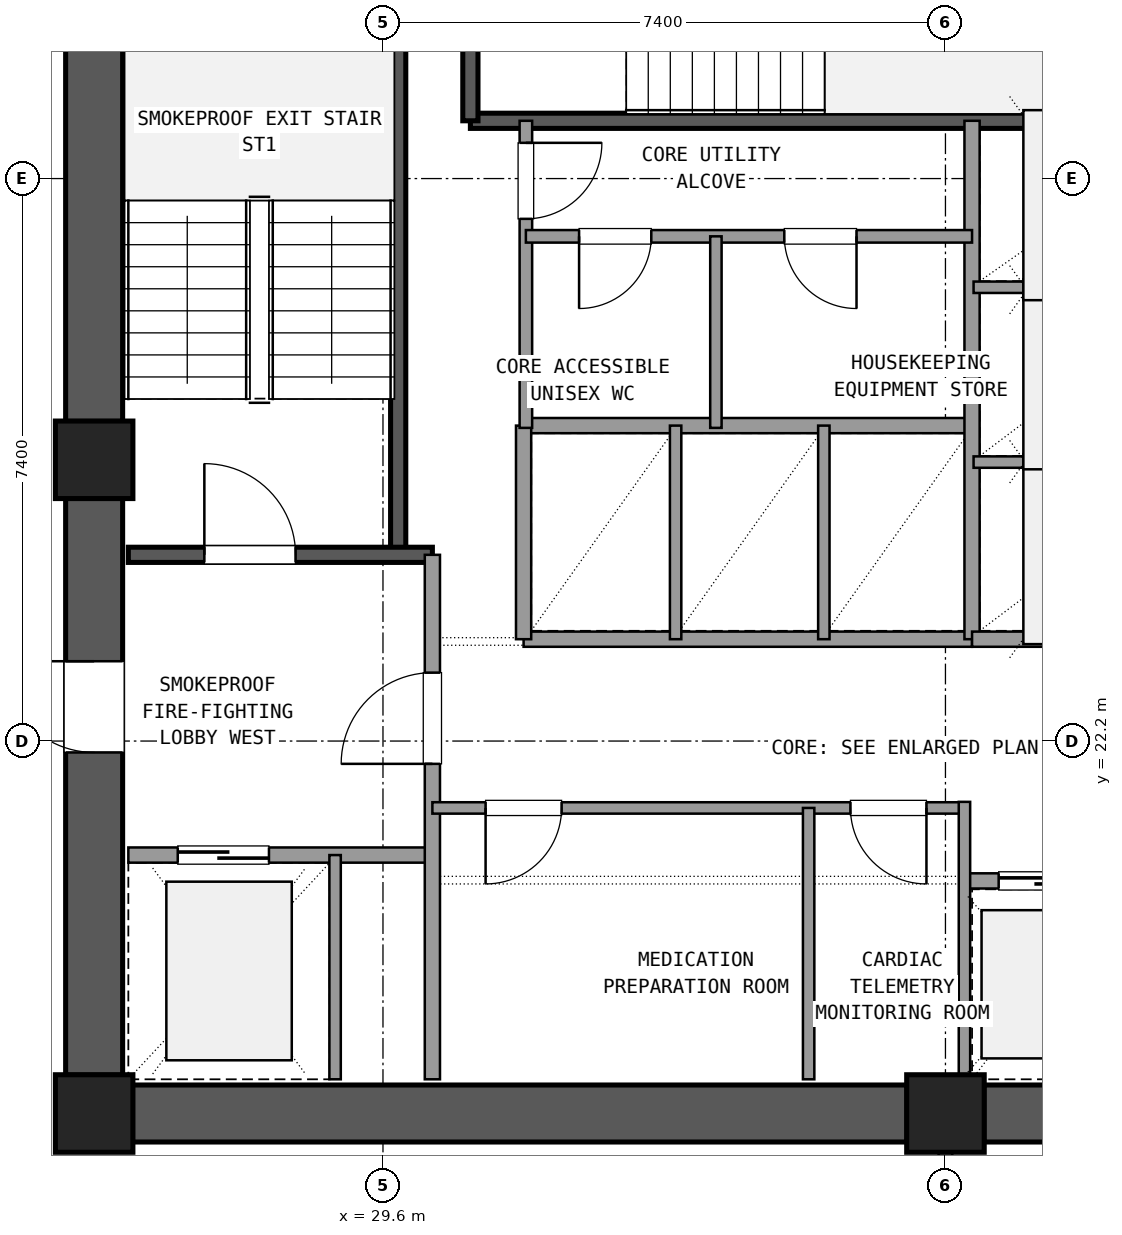
"""IFC4 building model, lengths in metres.
Left out: names, types, materials, properties, quantities, classifications, styles, units other than length and angle.
Written with IfcOpenShell. Run it as: python <this file> out.ifc"""

import sys

from ifc_helpers import new_model, si_unit, direction, frame, frame_2d, origin, origin_2d, place, context, subcontext, project, spatial, rectangle, extrude, element, fill, save


model = new_model("IFC4")
c1 = context("Model", 3, precision=1e-05, world=origin(), true_north=direction((0.0, 1.0)))
c2 = subcontext(c1, "Body", "Model", "MODEL_VIEW")
j1 = project(units=[si_unit("LENGTHUNIT", "METRE"), si_unit("PLANEANGLEUNIT", "RADIAN")], contexts=[c1])
p1 = place(None, origin())
s1 = spatial("IfcSite", under=j1, at=p1, CompositionType="ELEMENT")
p2 = place(p1, origin())
s2 = spatial("IfcBuilding", under=s1, at=p2, CompositionType="ELEMENT")
p3 = place(p2, frame((0.0, 0.0, 156.42)))
s3 = spatial("IfcBuildingStorey", under=s2, at=p3, CompositionType="ELEMENT", Elevation=156.42)
for number, where, z_axis, x_axis in (
    (1, (25.8, 17.3, 0.0), (0.0, 0.0, 1.0), (1.0, 0.0, 0.0)),
    (2, (37.0, 17.3, 0.0), (0.0, 0.0, 1.0), (1.0, 0.0, 0.0)),
    (3, (25.8, 25.9, 0.0), (0.0, 0.0, 1.0), (1.0, 0.0, 0.0)),
):
    element("IfcColumn", number, at=place(p3, frame(where, z_axis=z_axis, x_axis=x_axis)), inside=s3, PredefinedType="COLUMN", context=c2, shape_type="SweptSolid", body=[
        extrude(rectangle(XDim=1.02, YDim=1.02, at=origin_2d()), origin(), (0.0, 0.0, 1.0), 3.6),
    ])
for number, where, z_axis, x_axis in (
    (4, (26.305, 17.3, 0.0), (0.0, 0.0, 1.0), (1.0, 0.0, 0.0)),
    (5, (37.505, 17.3, 0.0), (0.0, 0.0, 1.0), (1.0, 0.0, 0.0)),
):
    element("IfcWall", number, at=place(p3, frame(where, z_axis=z_axis, x_axis=x_axis)), inside=s3, PredefinedType="SHEAR", context=c2, shape_type="SweptSolid", body=[
        extrude(rectangle(XDim=10.19, YDim=0.75, at=frame_2d((5.095, 0.0))), origin(), (0.0, 0.0, 1.0), 3.32),
    ])
p4 = place(p3, frame((25.8, 33.995, 0.0), z_axis=(0.0, 0.0, 1.0), x_axis=(0.0, -1.0, 0.0)))
e6 = element("IfcWall", 6, at=p4, inside=s3, PredefinedType="SHEAR", context=c2, shape_type="SweptSolid", body=[
    extrude(rectangle(XDim=7.59, YDim=0.75, at=frame_2d((3.795, 0.0))), origin(), (0.0, 0.0, 1.0), 3.32),
])
p5 = place(p3, frame((25.8, 25.395, 0.0), z_axis=(0.0, 0.0, 1.0), x_axis=(0.0, -1.0, 0.0)))
e7 = element("IfcWall", 7, at=p5, inside=s3, PredefinedType="SHEAR", context=c2, shape_type="SweptSolid", body=[
    extrude(rectangle(XDim=7.59, YDim=0.75, at=frame_2d((3.795, 0.0))), origin(), (0.0, 0.0, 1.0), 3.32),
])
p6 = place(p5, frame((2.145, 0.0, 0.0)))
e8 = element("IfcOpeningElement", 8, at=p6, cuts=e7, PredefinedType="OPENING", context=c2, shape_type="SweptSolid", body=[
    extrude(rectangle(XDim=1.2, YDim=2.15, at=frame_2d((0.6, 1.075))), frame((0.0, 0.385, 0.0), z_axis=(0.0, -1.0, 0.0), x_axis=(1.0, 0.0, 0.0)), (0.0, 0.0, 1.0), 0.77),
])
p7 = place(p3, frame((29.8, 24.65, 0.0), z_axis=(0.0, 0.0, 1.0), x_axis=(0.0, 1.0, 0.0)))
e9 = element("IfcWall", 9, at=p7, inside=s3, PredefinedType="SHEAR", context=c2, shape_type="SweptSolid", body=[
    extrude(rectangle(XDim=9.4, YDim=0.2, at=frame_2d((4.7, 0.0))), origin(), (0.0, 0.0, 1.0), 3.32),
])
p8 = place(p3, frame((26.25, 24.65, 0.0), z_axis=(0.0, 0.0, 1.0), x_axis=(1.0, 0.0, 0.0)))
e10 = element("IfcWall", 10, at=p8, inside=s3, PredefinedType="SHEAR", context=c2, shape_type="SweptSolid", body=[
    extrude(rectangle(XDim=4.0, YDim=0.2, at=frame_2d((2.0, 0.0))), origin(), (0.0, 0.0, 1.0), 3.32),
])
p9 = place(p8, frame((1.0, 0.0, 0.0)))
e11 = element("IfcOpeningElement", 11, at=p9, cuts=e10, PredefinedType="OPENING", context=c2, shape_type="SweptSolid", body=[
    extrude(rectangle(XDim=1.2, YDim=2.15, at=frame_2d((0.6, 1.075))), frame((0.0, 0.11, 0.0), z_axis=(0.0, -1.0, 0.0), x_axis=(1.0, 0.0, 0.0)), (0.0, 0.0, 1.0), 0.22),
])
p10 = place(p3, frame((30.75, 30.36, 0.0), z_axis=(0.0, 0.0, 1.0), x_axis=(1.0, 0.0, 0.0)))
e12 = element("IfcWall", 12, at=p10, inside=s3, PredefinedType="SHEAR", context=c2, shape_type="SweptSolid", body=[
    extrude(rectangle(XDim=9.5, YDim=0.2, at=frame_2d((4.75, 0.0))), origin(), (0.0, 0.0, 1.0), 3.32),
])
p11 = place(p3, frame((30.75, 30.36, 0.0), z_axis=(0.0, 0.0, 1.0), x_axis=(0.0, 1.0, 0.0)))
e13 = element("IfcWall", 13, at=p11, inside=s3, PredefinedType="SHEAR", context=c2, shape_type="SweptSolid", body=[
    extrude(rectangle(XDim=3.69, YDim=0.2, at=frame_2d((1.845, 0.0))), origin(), (0.0, 0.0, 1.0), 3.32),
])
p12 = place(p3, frame((26.25, 20.7, 0.0), z_axis=(0.0, 0.0, 1.0), x_axis=(1.0, 0.0, 0.0)))
e14 = element("IfcWall", 14, at=p12, inside=s3, PredefinedType="SOLIDWALL", context=c2, shape_type="SweptSolid", body=[
    extrude(rectangle(XDim=4.0, YDim=0.2, at=frame_2d((2.0, 0.0))), origin(), (0.0, 0.0, 1.0), 2.61),
])
p13 = place(p12, frame((0.65, 0.0, 0.0)))
e15 = element("IfcOpeningElement", 15, at=p13, cuts=e14, PredefinedType="OPENING", context=c2, shape_type="SweptSolid", body=[
    extrude(rectangle(XDim=1.2, YDim=2.15, at=frame_2d((0.6, 1.075))), frame((0.0, 0.11, 0.0), z_axis=(0.0, -1.0, 0.0), x_axis=(1.0, 0.0, 0.0)), (0.0, 0.0, 1.0), 0.22),
])
p14 = place(p3, frame((30.25, 17.75, 0.0), z_axis=(0.0, 0.0, 1.0), x_axis=(0.0, 1.0, 0.0)))
e16 = element("IfcWall", 16, at=p14, inside=s3, PredefinedType="SOLIDWALL", context=c2, shape_type="SweptSolid", body=[
    extrude(rectangle(XDim=6.9, YDim=0.2, at=frame_2d((3.45, 0.0))), origin(), (0.0, 0.0, 1.0), 2.61),
])
p15 = place(p14, frame((4.15, 0.0, 0.0)))
e17 = element("IfcOpeningElement", 17, at=p15, cuts=e16, PredefinedType="OPENING", context=c2, shape_type="SweptSolid", body=[
    extrude(rectangle(XDim=1.2, YDim=2.15, at=frame_2d((0.6, 1.075))), frame((0.0, 0.11, 0.0), z_axis=(0.0, -1.0, 0.0), x_axis=(1.0, 0.0, 0.0)), (0.0, 0.0, 1.0), 0.22),
])
p16 = place(p3, frame((28.97, 17.75, 0.0), z_axis=(0.0, 0.0, 1.0), x_axis=(0.0, 1.0, 0.0)))
e18 = element("IfcWall", 18, at=p16, inside=s3, PredefinedType="PARTITIONING", context=c2, shape_type="SweptSolid", body=[
    extrude(rectangle(XDim=2.95, YDim=0.15, at=frame_2d((1.475, 0.0))), origin(), (0.0, 0.0, 1.0), 2.61),
])
p17 = place(p3, frame((30.25, 21.32, 0.0), z_axis=(0.0, 0.0, 1.0), x_axis=(1.0, 0.0, 0.0)))
e19 = element("IfcWall", 19, at=p17, inside=s3, PredefinedType="PARTITIONING", context=c2, shape_type="SweptSolid", body=[
    extrude(rectangle(XDim=7.0, YDim=0.15, at=frame_2d((3.5, 0.0))), origin(), (0.0, 0.0, 1.0), 2.61),
])
p18 = place(p17, frame((0.7, 0.0, 0.0)))
e20 = element("IfcOpeningElement", 20, at=p18, cuts=e19, PredefinedType="OPENING", context=c2, shape_type="SweptSolid", body=[
    extrude(rectangle(XDim=1.0, YDim=2.15, at=frame_2d((0.5, 1.075))), frame((0.0, 0.085, 0.0), z_axis=(0.0, -1.0, 0.0), x_axis=(1.0, 0.0, 0.0)), (0.0, 0.0, 1.0), 0.17),
])
p19 = place(p17, frame((5.5, 0.0, 0.0)))
e21 = element("IfcOpeningElement", 21, at=p19, cuts=e19, PredefinedType="OPENING", context=c2, shape_type="SweptSolid", body=[
    extrude(rectangle(XDim=1.0, YDim=2.15, at=frame_2d((0.5, 1.075))), frame((0.0, 0.085, 0.0), z_axis=(0.0, -1.0, 0.0), x_axis=(1.0, 0.0, 0.0)), (0.0, 0.0, 1.0), 0.17),
])
p20 = place(p3, frame((35.2, 17.75, 0.0), z_axis=(0.0, 0.0, 1.0), x_axis=(0.0, 1.0, 0.0)))
e22 = element("IfcWall", 22, at=p20, inside=s3, PredefinedType="PARTITIONING", context=c2, shape_type="SweptSolid", body=[
    extrude(rectangle(XDim=3.57, YDim=0.15, at=frame_2d((1.785, 0.0))), origin(), (0.0, 0.0, 1.0), 2.61),
])
p21 = place(p3, frame((37.25, 20.36, 0.0), z_axis=(0.0, 0.0, 1.0), x_axis=(1.0, 0.0, 0.0)))
e23 = element("IfcWall", 23, at=p21, inside=s3, PredefinedType="SOLIDWALL", context=c2, shape_type="SweptSolid", body=[
    extrude(rectangle(XDim=6.1, YDim=0.2, at=frame_2d((3.05, 0.0))), origin(), (0.0, 0.0, 1.0), 2.61),
])
p22 = place(p21, frame((0.45, 0.0, 0.0)))
e24 = element("IfcOpeningElement", 24, at=p22, cuts=e23, PredefinedType="OPENING", context=c2, shape_type="SweptSolid", body=[
    extrude(rectangle(XDim=1.1, YDim=2.15, at=frame_2d((0.55, 1.075))), frame((0.0, 0.11, 0.0), z_axis=(0.0, -1.0, 0.0), x_axis=(1.0, 0.0, 0.0)), (0.0, 0.0, 1.0), 0.22),
])
p23 = place(p21, frame((2.5, 0.0, 0.0)))
e25 = element("IfcOpeningElement", 25, at=p23, cuts=e23, PredefinedType="OPENING", context=c2, shape_type="SweptSolid", body=[
    extrude(rectangle(XDim=1.1, YDim=2.15, at=frame_2d((0.55, 1.075))), frame((0.0, 0.11, 0.0), z_axis=(0.0, -1.0, 0.0), x_axis=(1.0, 0.0, 0.0)), (0.0, 0.0, 1.0), 0.22),
])
p24 = place(p21, frame((4.55, 0.0, 0.0)))
e26 = element("IfcOpeningElement", 26, at=p24, cuts=e23, PredefinedType="OPENING", context=c2, shape_type="SweptSolid", body=[
    extrude(rectangle(XDim=1.1, YDim=2.15, at=frame_2d((0.55, 1.075))), frame((0.0, 0.11, 0.0), z_axis=(0.0, -1.0, 0.0), x_axis=(1.0, 0.0, 0.0)), (0.0, 0.0, 1.0), 0.22),
])
p25 = place(p3, frame((37.25, 17.75, 0.0), z_axis=(0.0, 0.0, 1.0), x_axis=(0.0, 1.0, 0.0)))
e27 = element("IfcWall", 27, at=p25, inside=s3, PredefinedType="PARTITIONING", context=c2, shape_type="SweptSolid", body=[
    extrude(rectangle(XDim=3.65, YDim=0.15, at=frame_2d((1.825, 0.0))), origin(), (0.0, 0.0, 1.0), 2.61),
])
for number, where, z_axis, x_axis in (
    (28, (31.45, 23.54, 0.0), (0.0, 0.0, 1.0), (1.0, 0.0, 0.0)),
    (29, (31.45, 26.35, 0.0), (0.0, 0.0, 1.0), (1.0, 0.0, 0.0)),
):
    element("IfcWall", number, at=place(p3, frame(where, z_axis=z_axis, x_axis=x_axis)), inside=s3, PredefinedType="SOLIDWALL", context=c2, shape_type="SweptSolid", body=[
        extrude(rectangle(XDim=5.9, YDim=0.2, at=frame_2d((2.95, 0.0))), origin(), (0.0, 0.0, 1.0), 2.61),
    ])
p26 = place(p3, frame((31.45, 23.54, 0.0), z_axis=(0.0, 0.0, 1.0), x_axis=(0.0, 1.0, 0.0)))
e30 = element("IfcWall", 30, at=p26, inside=s3, PredefinedType="SOLIDWALL", context=c2, shape_type="SweptSolid", body=[
    extrude(rectangle(XDim=2.81, YDim=0.2, at=frame_2d((1.405, 0.0))), origin(), (0.0, 0.0, 1.0), 2.61),
])
for number, where, z_axis, x_axis in (
    (31, (33.45, 23.54, 0.0), (0.0, 0.0, 1.0), (0.0, 1.0, 0.0)),
    (32, (35.4, 23.54, 0.0), (0.0, 0.0, 1.0), (0.0, 1.0, 0.0)),
):
    element("IfcWall", number, at=place(p3, frame(where, z_axis=z_axis, x_axis=x_axis)), inside=s3, PredefinedType="PARTITIONING", context=c2, shape_type="SweptSolid", body=[
        extrude(rectangle(XDim=2.81, YDim=0.15, at=frame_2d((1.405, 0.0))), origin(), (0.0, 0.0, 1.0), 2.61),
    ])
p27 = place(p3, frame((37.35, 23.54, 0.0), z_axis=(0.0, 0.0, 1.0), x_axis=(0.0, 1.0, 0.0)))
e33 = element("IfcWall", 33, at=p27, inside=s3, PredefinedType="SOLIDWALL", context=c2, shape_type="SweptSolid", body=[
    extrude(rectangle(XDim=6.82, YDim=0.2, at=frame_2d((3.41, 0.0))), origin(), (0.0, 0.0, 1.0), 2.61),
])
p28 = place(p3, frame((37.35, 23.54, 0.0), z_axis=(0.0, 0.0, 1.0), x_axis=(1.0, 0.0, 0.0)))
e34 = element("IfcWall", 34, at=p28, inside=s3, PredefinedType="SOLIDWALL", context=c2, shape_type="SweptSolid", body=[
    extrude(rectangle(XDim=3.05, YDim=0.2, at=frame_2d((1.525, 0.0))), origin(), (0.0, 0.0, 1.0), 2.61),
])
for number, where, z_axis, x_axis in (
    (35, (37.37, 25.87, 0.0), (0.0, 0.0, 1.0), (1.0, 0.0, 0.0)),
    (36, (37.37, 28.17, 0.0), (0.0, 0.0, 1.0), (1.0, 0.0, 0.0)),
):
    element("IfcWall", number, at=place(p3, frame(where, z_axis=z_axis, x_axis=x_axis)), inside=s3, PredefinedType="PARTITIONING", context=c2, shape_type="SweptSolid", body=[
        extrude(rectangle(XDim=3.01, YDim=0.15, at=frame_2d((1.505, 0.0))), origin(), (0.0, 0.0, 1.0), 2.61),
    ])
p29 = place(p3, frame((31.48, 26.32, 0.0), z_axis=(0.0, 0.0, 1.0), x_axis=(0.0, 1.0, 0.0)))
e37 = element("IfcWall", 37, at=p29, inside=s3, PredefinedType="PLUMBINGWALL", context=c2, shape_type="SweptSolid", body=[
    extrude(rectangle(XDim=4.04, YDim=0.165, at=frame_2d((2.02, 0.0))), origin(), (0.0, 0.0, 1.0), 2.61),
])
p30 = place(p29, frame((2.75, 0.0, 0.0)))
e38 = element("IfcOpeningElement", 38, at=p30, cuts=e37, PredefinedType="OPENING", context=c2, shape_type="SweptSolid", body=[
    extrude(rectangle(XDim=1.0, YDim=2.15, at=frame_2d((0.5, 1.075))), frame((0.0, 0.093, 0.0), z_axis=(0.0, -1.0, 0.0), x_axis=(1.0, 0.0, 0.0)), (0.0, 0.0, 1.0), 0.185),
])
p31 = place(p3, frame((31.48, 28.84, 0.0), z_axis=(0.0, 0.0, 1.0), x_axis=(1.0, 0.0, 0.0)))
e39 = element("IfcWall", 39, at=p31, inside=s3, PredefinedType="PLUMBINGWALL", context=c2, shape_type="SweptSolid", body=[
    extrude(rectangle(XDim=5.87, YDim=0.165, at=frame_2d((2.935, 0.0))), origin(), (0.0, 0.0, 1.0), 2.61),
])
p32 = place(p31, frame((0.7, 0.0, 0.0)))
e40 = element("IfcOpeningElement", 40, at=p32, cuts=e39, PredefinedType="OPENING", context=c2, shape_type="SweptSolid", body=[
    extrude(rectangle(XDim=0.95, YDim=2.1, at=frame_2d((0.475, 1.05))), frame((0.0, 0.093, 0.0), z_axis=(0.0, -1.0, 0.0), x_axis=(1.0, 0.0, 0.0)), (0.0, 0.0, 1.0), 0.185),
])
p33 = place(p31, frame((3.4, 0.0, 0.0)))
e41 = element("IfcOpeningElement", 41, at=p33, cuts=e39, PredefinedType="OPENING", context=c2, shape_type="SweptSolid", body=[
    extrude(rectangle(XDim=0.95, YDim=2.1, at=frame_2d((0.475, 1.05))), frame((0.0, 0.093, 0.0), z_axis=(0.0, -1.0, 0.0), x_axis=(1.0, 0.0, 0.0)), (0.0, 0.0, 1.0), 0.185),
])
p34 = place(p3, frame((33.98, 26.32, 0.0), z_axis=(0.0, 0.0, 1.0), x_axis=(0.0, 1.0, 0.0)))
e42 = element("IfcWall", 42, at=p34, inside=s3, PredefinedType="PARTITIONING", context=c2, shape_type="SweptSolid", body=[
    extrude(rectangle(XDim=2.52, YDim=0.15, at=frame_2d((1.26, 0.0))), origin(), (0.0, 0.0, 1.0), 2.61),
])
p35 = place(p3, frame((37.0, 13.64, 0.0), z_axis=(0.0, 0.0, 1.0), x_axis=(0.0, 1.0, 0.0)))
e43 = element("IfcWall", 43, at=p35, inside=s3, PredefinedType="PARTITIONING", context=c2, shape_type="SweptSolid", body=[
    extrude(rectangle(XDim=3.21, YDim=0.18, at=frame_2d((1.605, 0.0))), origin(), (0.0, 0.0, 1.0), 2.61),
])
p36 = place(p35, frame((0.605, 0.0, 0.0)))
e44 = element("IfcOpeningElement", 44, at=p36, cuts=e43, PredefinedType="OPENING", context=c2, shape_type="SweptSolid", body=[
    extrude(rectangle(XDim=2.0, YDim=2.2, at=frame_2d((1.0, 1.1))), frame((0.0, 0.1, 0.0), z_axis=(0.0, -1.0, 0.0), x_axis=(1.0, 0.0, 0.0)), (0.0, 0.0, 1.0), 0.2),
])
p37 = place(p9, origin())
e45 = element("IfcDoor", 45, at=p37, inside=s3, OperationType="SINGLE_SWING_LEFT", PredefinedType="DOOR", context=c2, shape_type="SweptSolid", body=[
    extrude(rectangle(XDim=1.2, YDim=2.15, at=frame_2d((0.6, 1.075))), frame((0.0, 0.025, 0.0), z_axis=(0.0, -1.0, 0.0), x_axis=(1.0, 0.0, 0.0)), (0.0, 0.0, 1.0), 0.05),
])
fill(e11, e45)
p38 = place(p13, origin())
e46 = element("IfcDoor", 46, at=p38, inside=s3, OperationType="SLIDING_TO_LEFT", PredefinedType="DOOR", context=c2, shape_type="SweptSolid", body=[
    extrude(rectangle(XDim=1.2, YDim=2.15, at=frame_2d((0.6, 1.075))), frame((0.0, 0.025, 0.0), z_axis=(0.0, -1.0, 0.0), x_axis=(1.0, 0.0, 0.0)), (0.0, 0.0, 1.0), 0.05),
])
fill(e15, e46)
p39 = place(p15, origin())
e47 = element("IfcDoor", 47, at=p39, inside=s3, OperationType="SINGLE_SWING_LEFT", PredefinedType="DOOR", context=c2, shape_type="SweptSolid", body=[
    extrude(rectangle(XDim=1.2, YDim=2.15, at=frame_2d((0.6, 1.075))), frame((0.0, 0.025, 0.0), z_axis=(0.0, -1.0, 0.0), x_axis=(1.0, 0.0, 0.0)), (0.0, 0.0, 1.0), 0.05),
])
fill(e17, e47)
p40 = place(p6, frame((1.2, 0.0, 0.0), z_axis=(0.0, 0.0, 1.0), x_axis=(-1.0, 0.0, 0.0)))
e48 = element("IfcDoor", 48, at=p40, inside=s3, OperationType="SINGLE_SWING_LEFT", PredefinedType="DOOR", context=c2, shape_type="SweptSolid", body=[
    extrude(rectangle(XDim=1.2, YDim=2.15, at=frame_2d((0.6, 1.075))), frame((0.0, 0.025, 0.0), z_axis=(0.0, -1.0, 0.0), x_axis=(1.0, 0.0, 0.0)), (0.0, 0.0, 1.0), 0.05),
])
fill(e8, e48)
p41 = place(p18, frame((1.0, 0.0, 0.0), z_axis=(0.0, 0.0, 1.0), x_axis=(-1.0, 0.0, 0.0)))
e49 = element("IfcDoor", 49, at=p41, inside=s3, OperationType="SINGLE_SWING_LEFT", PredefinedType="DOOR", context=c2, shape_type="SweptSolid", body=[
    extrude(rectangle(XDim=1.0, YDim=2.15, at=frame_2d((0.5, 1.075))), frame((0.0, 0.025, 0.0), z_axis=(0.0, -1.0, 0.0), x_axis=(1.0, 0.0, 0.0)), (0.0, 0.0, 1.0), 0.05),
])
fill(e20, e49)
p42 = place(p19, frame((1.0, 0.0, 0.0), z_axis=(0.0, 0.0, 1.0), x_axis=(-1.0, 0.0, 0.0)))
e50 = element("IfcDoor", 50, at=p42, inside=s3, OperationType="SINGLE_SWING_RIGHT", PredefinedType="DOOR", context=c2, shape_type="SweptSolid", body=[
    extrude(rectangle(XDim=1.0, YDim=2.15, at=frame_2d((0.5, 1.075))), frame((0.0, 0.025, 0.0), z_axis=(0.0, -1.0, 0.0), x_axis=(1.0, 0.0, 0.0)), (0.0, 0.0, 1.0), 0.05),
])
fill(e21, e50)
p43 = place(p22, origin())
e51 = element("IfcDoor", 51, at=p43, inside=s3, OperationType="SLIDING_TO_LEFT", PredefinedType="DOOR", context=c2, shape_type="SweptSolid", body=[
    extrude(rectangle(XDim=1.1, YDim=2.15, at=frame_2d((0.55, 1.075))), frame((0.0, 0.025, 0.0), z_axis=(0.0, -1.0, 0.0), x_axis=(1.0, 0.0, 0.0)), (0.0, 0.0, 1.0), 0.05),
])
fill(e24, e51)
p44 = place(p30, frame((1.0, 0.0, 0.0), z_axis=(0.0, 0.0, 1.0), x_axis=(-1.0, 0.0, 0.0)))
e52 = element("IfcDoor", 52, at=p44, inside=s3, OperationType="SINGLE_SWING_RIGHT", PredefinedType="DOOR", context=c2, shape_type="SweptSolid", body=[
    extrude(rectangle(XDim=1.0, YDim=2.15, at=frame_2d((0.5, 1.075))), frame((0.0, 0.025, 0.0), z_axis=(0.0, -1.0, 0.0), x_axis=(1.0, 0.0, 0.0)), (0.0, 0.0, 1.0), 0.05),
])
fill(e38, e52)
p45 = place(p32, frame((0.95, 0.0, 0.0), z_axis=(0.0, 0.0, 1.0), x_axis=(-1.0, 0.0, 0.0)))
e53 = element("IfcDoor", 53, at=p45, inside=s3, OperationType="SINGLE_SWING_LEFT", PredefinedType="DOOR", context=c2, shape_type="SweptSolid", body=[
    extrude(rectangle(XDim=0.95, YDim=2.1, at=frame_2d((0.475, 1.05))), frame((0.0, 0.025, 0.0), z_axis=(0.0, -1.0, 0.0), x_axis=(1.0, 0.0, 0.0)), (0.0, 0.0, 1.0), 0.05),
])
fill(e40, e53)
p46 = place(p33, frame((0.95, 0.0, 0.0), z_axis=(0.0, 0.0, 1.0), x_axis=(-1.0, 0.0, 0.0)))
e54 = element("IfcDoor", 54, at=p46, inside=s3, OperationType="SINGLE_SWING_RIGHT", PredefinedType="DOOR", context=c2, shape_type="SweptSolid", body=[
    extrude(rectangle(XDim=0.95, YDim=2.1, at=frame_2d((0.475, 1.05))), frame((0.0, 0.025, 0.0), z_axis=(0.0, -1.0, 0.0), x_axis=(1.0, 0.0, 0.0)), (0.0, 0.0, 1.0), 0.05),
])
fill(e41, e54)
save(model, sys.argv[1])
